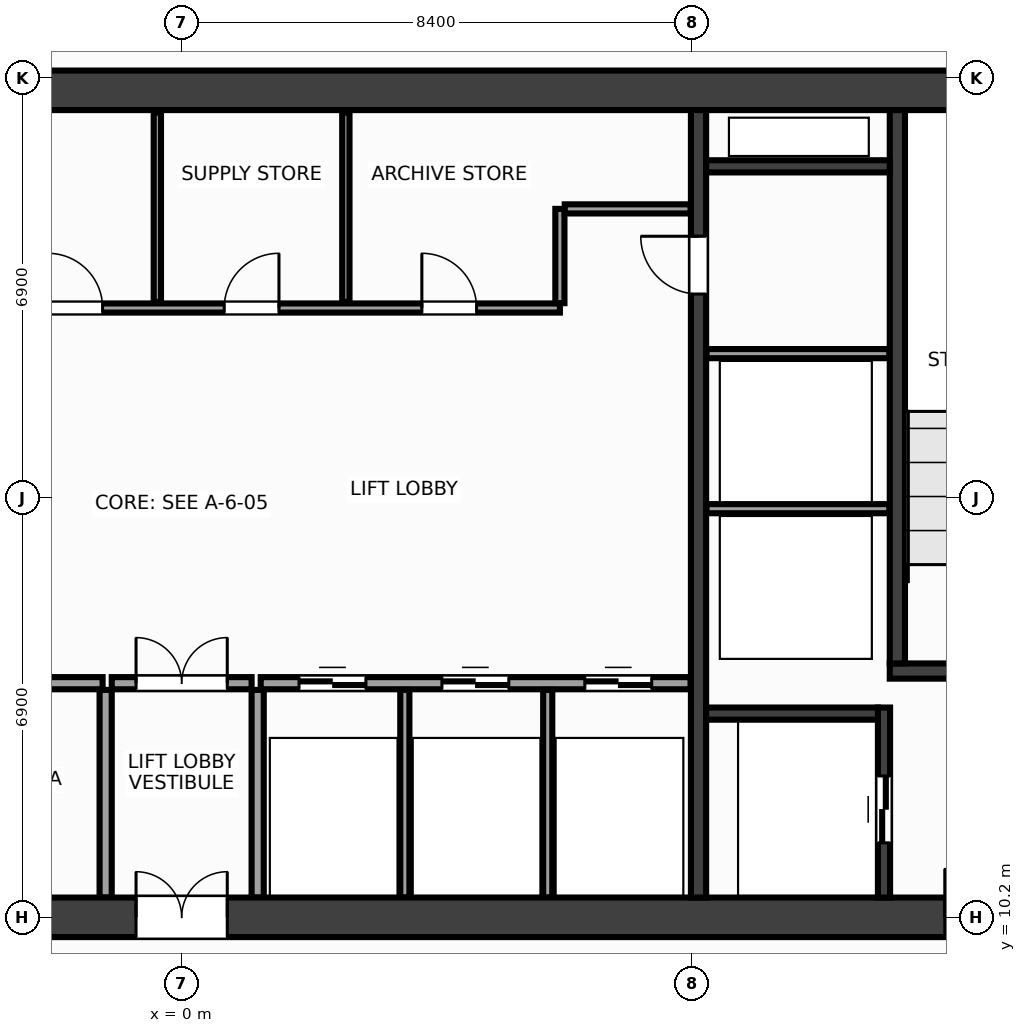
"""IFC4 building model, lengths in metres.
Left out: names, types, materials, properties, quantities, classifications, styles, units other than length and angle.
Written with IfcOpenShell. Run it as: python <this file> out.ifc"""

import sys

from ifc_helpers import new_model, si_unit, direction, frame, frame_2d, origin, place, context, subcontext, project, spatial, rectangle, extrude, source, transform, mapped, element, fill, save


model = new_model("IFC4")
c1 = context("Model", 3, precision=1e-05, world=origin(), true_north=direction((0.0, 1.0)))
c2 = subcontext(c1, "Body", "Model", "MODEL_VIEW")
j1 = project(units=[si_unit("LENGTHUNIT", "METRE"), si_unit("PLANEANGLEUNIT", "RADIAN")], contexts=[c1])
p1 = place(None, origin())
s1 = spatial("IfcSite", under=j1, at=p1, CompositionType="ELEMENT")
p2 = place(p1, origin())
s2 = spatial("IfcBuilding", under=s1, at=p2, CompositionType="ELEMENT")
p3 = place(p2, frame((0.0, 0.0, 138.8)))
s3 = spatial("IfcBuildingStorey", under=s2, at=p3, CompositionType="ELEMENT", Elevation=138.8)
m1 = source(origin(), c2, "Body", "SweptSolid", [
    extrude(rectangle(XDim=31.85, YDim=0.65, at=frame_2d((15.925, 0.0))), origin(), (0.0, 0.0, 1.0), 3.6),
])
p4 = place(p3, frame((-15.925, 23.8, 0.0), z_axis=(0.0, 0.0, 1.0), x_axis=(1.0, 0.0, 0.0)))
e1 = element("IfcWall", 1, at=p4, inside=s3, PredefinedType="SHEAR", context=c2, shape_type="MappedRepresentation", body=[
    mapped(m1, transform((0.0, 0.0, 0.0), x_axis=(1.0, 0.0, 0.0), y_axis=(0.0, 1.0, 0.0), z_axis=(0.0, 0.0, 1.0), scale=1.0)),
])
p5 = place(p3, frame((-15.925, 10.2, 0.0), z_axis=(0.0, 0.0, 1.0), x_axis=(1.0, 0.0, 0.0)))
e2 = element("IfcWall", 2, at=p5, inside=s3, PredefinedType="SHEAR", context=c2, shape_type="MappedRepresentation", body=[
    mapped(m1, transform((0.0, 0.0, 0.0), x_axis=(1.0, 0.0, 0.0), y_axis=(0.0, 1.0, 0.0), z_axis=(0.0, 0.0, 1.0), scale=1.0)),
])
p6 = place(p5, frame((1.775, 0.0, 0.0)))
e3 = element("IfcOpeningElement", 3, at=p6, cuts=e2, PredefinedType="OPENING", context=c2, shape_type="SweptSolid", body=[
    extrude(rectangle(XDim=1.6, YDim=2.15, at=frame_2d((0.8, 1.075))), frame((0.0, 0.337, 0.0), z_axis=(0.0, -1.0, 0.0), x_axis=(1.0, 0.0, 0.0)), (0.0, 0.0, 1.0), 0.674),
])
p7 = place(p5, frame((28.475, 0.0, 0.0)))
e4 = element("IfcOpeningElement", 4, at=p7, cuts=e2, PredefinedType="OPENING", context=c2, shape_type="SweptSolid", body=[
    extrude(rectangle(XDim=1.6, YDim=2.15, at=frame_2d((0.8, 1.075))), frame((0.0, 0.337, 0.0), z_axis=(0.0, -1.0, 0.0), x_axis=(1.0, 0.0, 0.0)), (0.0, 0.0, 1.0), 0.674),
])
p8 = place(p5, frame((15.175, 0.0, 0.0)))
e5 = element("IfcOpeningElement", 5, at=p8, cuts=e2, PredefinedType="OPENING", context=c2, shape_type="SweptSolid", body=[
    extrude(rectangle(XDim=1.5, YDim=2.2, at=frame_2d((0.75, 1.1))), frame((0.0, 0.337, 0.0), z_axis=(0.0, -1.0, 0.0), x_axis=(1.0, 0.0, 0.0)), (0.0, 0.0, 1.0), 0.674),
])
m2 = source(origin(), c2, "Body", "SweptSolid", [
    extrude(rectangle(XDim=12.95, YDim=0.25, at=frame_2d((6.475, 0.0))), origin(), (0.0, 0.0, 1.0), 3.6),
])
p9 = place(p3, frame((8.5, 10.525, 0.0), z_axis=(0.0, 0.0, 1.0), x_axis=(0.0, 1.0, 0.0)))
e6 = element("IfcWall", 6, at=p9, inside=s3, PredefinedType="SHEAR", context=c2, shape_type="MappedRepresentation", body=[
    mapped(m2, transform((0.0, 0.0, 0.0), x_axis=(1.0, 0.0, 0.0), y_axis=(0.0, 1.0, 0.0), z_axis=(0.0, 0.0, 1.0), scale=1.0)),
])
p10 = place(p9, frame((9.925, 0.0, 0.0)))
e7 = element("IfcOpeningElement", 7, at=p10, cuts=e6, PredefinedType="OPENING", context=c2, shape_type="SweptSolid", body=[
    extrude(rectangle(XDim=0.95, YDim=2.15, at=frame_2d((0.475, 1.075))), frame((0.0, 0.137, 0.0), z_axis=(0.0, -1.0, 0.0), x_axis=(1.0, 0.0, 0.0)), (0.0, 0.0, 1.0), 0.274),
])
m3 = source(origin(), c2, "Body", "SweptSolid", [
    extrude(rectangle(XDim=3.63, YDim=0.25, at=frame_2d((1.815, 0.0))), origin(), (0.0, 0.0, 1.0), 3.6),
])
p11 = place(p3, frame((11.645, 14.25, 0.0), z_axis=(0.0, 0.0, 1.0), x_axis=(1.0, 0.0, 0.0)))
e8 = element("IfcWall", 8, at=p11, inside=s3, PredefinedType="SHEAR", context=c2, shape_type="MappedRepresentation", body=[
    mapped(m3, transform((0.0, 0.0, 0.0), x_axis=(1.0, 0.0, 0.0), y_axis=(0.0, 1.0, 0.0), z_axis=(0.0, 0.0, 1.0), scale=1.0)),
])
p12 = place(p11, frame((0.95, 0.0, 0.0)))
e9 = element("IfcOpeningElement", 9, at=p12, cuts=e8, PredefinedType="OPENING", context=c2, shape_type="SweptSolid", body=[
    extrude(rectangle(XDim=1.6, YDim=2.15, at=frame_2d((0.8, 1.075))), frame((0.0, 0.137, 0.0), z_axis=(0.0, -1.0, 0.0), x_axis=(1.0, 0.0, 0.0)), (0.0, 0.0, 1.0), 0.274),
])
m4 = source(origin(), c2, "Body", "SweptSolid", [
    extrude(rectangle(XDim=9.1, YDim=0.25, at=frame_2d((4.55, 0.0))), origin(), (0.0, 0.0, 1.0), 3.6),
])
p13 = place(p3, frame((11.77, 14.375, 0.0), z_axis=(0.0, 0.0, 1.0), x_axis=(0.0, 1.0, 0.0)))
e10 = element("IfcWall", 10, at=p13, inside=s3, PredefinedType="SHEAR", context=c2, shape_type="MappedRepresentation", body=[
    mapped(m4, transform((0.0, 0.0, 0.0), x_axis=(1.0, 0.0, 0.0), y_axis=(0.0, 1.0, 0.0), z_axis=(0.0, 0.0, 1.0), scale=1.0)),
])
m5 = source(origin(), c2, "Body", "SweptSolid", [
    extrude(rectangle(XDim=3.125, YDim=0.2, at=frame_2d((1.562, 0.0))), origin(), (0.0, 0.0, 1.0), 3.6),
])
p14 = place(p3, frame((11.55, 10.525, 0.0), z_axis=(0.0, 0.0, 1.0), x_axis=(0.0, 1.0, 0.0)))
e11 = element("IfcWall", 11, at=p14, inside=s3, PredefinedType="SHEAR", context=c2, shape_type="MappedRepresentation", body=[
    mapped(m5, transform((0.0, 0.0, 0.0), x_axis=(1.0, 0.0, 0.0), y_axis=(0.0, 1.0, 0.0), z_axis=(0.0, 0.0, 1.0), scale=1.0)),
])
p15 = place(p14, frame((0.9, 0.0, 0.0)))
e12 = element("IfcOpeningElement", 12, at=p15, cuts=e11, PredefinedType="OPENING", context=c2, shape_type="SweptSolid", body=[
    extrude(rectangle(XDim=1.1, YDim=2.15, at=frame_2d((0.55, 1.075))), frame((0.0, 0.112, 0.0), z_axis=(0.0, -1.0, 0.0), x_axis=(1.0, 0.0, 0.0)), (0.0, 0.0, 1.0), 0.224),
])
m6 = source(origin(), c2, "Body", "SweptSolid", [
    extrude(rectangle(XDim=2.825, YDim=0.2, at=frame_2d((1.413, 0.0))), origin(), (0.0, 0.0, 1.0), 3.6),
])
p16 = place(p3, frame((8.625, 13.55, 0.0), z_axis=(0.0, 0.0, 1.0), x_axis=(1.0, 0.0, 0.0)))
e13 = element("IfcWall", 13, at=p16, inside=s3, PredefinedType="SHEAR", context=c2, shape_type="MappedRepresentation", body=[
    mapped(m6, transform((0.0, 0.0, 0.0), x_axis=(1.0, 0.0, 0.0), y_axis=(0.0, 1.0, 0.0), z_axis=(0.0, 0.0, 1.0), scale=1.0)),
])
m7 = source(origin(), c2, "Body", "SweptSolid", [
    extrude(rectangle(XDim=3.02, YDim=0.2, at=frame_2d((1.51, 0.0))), origin(), (0.0, 0.0, 1.0), 3.6),
])
p17 = place(p3, frame((8.625, 22.55, 0.0), z_axis=(0.0, 0.0, 1.0), x_axis=(1.0, 0.0, 0.0)))
e14 = element("IfcWall", 14, at=p17, inside=s3, PredefinedType="SHEAR", context=c2, shape_type="MappedRepresentation", body=[
    mapped(m7, transform((0.0, 0.0, 0.0), x_axis=(1.0, 0.0, 0.0), y_axis=(0.0, 1.0, 0.0), z_axis=(0.0, 0.0, 1.0), scale=1.0)),
])
m8 = source(origin(), c2, "Body", "SweptSolid", [
    extrude(rectangle(XDim=3.01, YDim=0.15, at=frame_2d((1.505, 0.0))), origin(), (0.0, 0.0, 1.0), 3.38),
])
for number, where, z_axis, x_axis in (
    (15, (8.63, 16.92, 0.0), (0.0, 0.0, 1.0), (1.0, 0.0, 0.0)),
    (16, (8.63, 19.47, 0.0), (0.0, 0.0, 1.0), (1.0, 0.0, 0.0)),
):
    element("IfcWall", number, at=place(p3, frame(where, z_axis=z_axis, x_axis=x_axis)), inside=s3, PredefinedType="PARTITIONING", context=c2, shape_type="MappedRepresentation", body=[
        mapped(m8, transform((0.0, 0.0, 0.0), x_axis=(1.0, 0.0, 0.0), y_axis=(0.0, 1.0, 0.0), z_axis=(0.0, 0.0, 1.0), scale=1.0)),
    ])
m9 = source(origin(), c2, "Body", "SweptSolid", [
    extrude(rectangle(XDim=7.07, YDim=0.2, at=frame_2d((3.535, 0.0))), origin(), (0.0, 0.0, 1.0), 3.38),
])
p18 = place(p3, frame((-8.37, 14.05, 0.0), z_axis=(0.0, 0.0, 1.0), x_axis=(1.0, 0.0, 0.0)))
e17 = element("IfcWall", 17, at=p18, inside=s3, PredefinedType="PARTITIONING", context=c2, shape_type="MappedRepresentation", body=[
    mapped(m9, transform((0.0, 0.0, 0.0), x_axis=(1.0, 0.0, 0.0), y_axis=(0.0, 1.0, 0.0), z_axis=(0.0, 0.0, 1.0), scale=1.0)),
])
p19 = place(p18, frame((1.06, 0.0, 0.0)))
e18 = element("IfcOpeningElement", 18, at=p19, cuts=e17, PredefinedType="OPENING", context=c2, shape_type="SweptSolid", body=[
    extrude(rectangle(XDim=0.9, YDim=2.15, at=frame_2d((0.45, 1.075))), frame((0.0, 0.112, 0.0), z_axis=(0.0, -1.0, 0.0), x_axis=(1.0, 0.0, 0.0)), (0.0, 0.0, 1.0), 0.224),
])
p20 = place(p18, frame((4.51, 0.0, 0.0)))
e19 = element("IfcOpeningElement", 19, at=p20, cuts=e17, PredefinedType="OPENING", context=c2, shape_type="SweptSolid", body=[
    extrude(rectangle(XDim=0.9, YDim=2.15, at=frame_2d((0.45, 1.075))), frame((0.0, 0.112, 0.0), z_axis=(0.0, -1.0, 0.0), x_axis=(1.0, 0.0, 0.0)), (0.0, 0.0, 1.0), 0.224),
])
p21 = place(p3, frame((1.3, 14.05, 0.0), z_axis=(0.0, 0.0, 1.0), x_axis=(1.0, 0.0, 0.0)))
e20 = element("IfcWall", 20, at=p21, inside=s3, PredefinedType="PARTITIONING", context=c2, shape_type="MappedRepresentation", body=[
    mapped(m9, transform((0.0, 0.0, 0.0), x_axis=(1.0, 0.0, 0.0), y_axis=(0.0, 1.0, 0.0), z_axis=(0.0, 0.0, 1.0), scale=1.0)),
])
p22 = place(p21, frame((0.63, 0.0, 0.0)))
e21 = element("IfcOpeningElement", 21, at=p22, cuts=e20, PredefinedType="OPENING", context=c2, shape_type="SweptSolid", body=[
    extrude(rectangle(XDim=1.1, YDim=2.15, at=frame_2d((0.55, 1.075))), frame((0.0, 0.112, 0.0), z_axis=(0.0, -1.0, 0.0), x_axis=(1.0, 0.0, 0.0)), (0.0, 0.0, 1.0), 0.224),
])
p23 = place(p21, frame((2.98, 0.0, 0.0)))
e22 = element("IfcOpeningElement", 22, at=p23, cuts=e20, PredefinedType="OPENING", context=c2, shape_type="SweptSolid", body=[
    extrude(rectangle(XDim=1.1, YDim=2.15, at=frame_2d((0.55, 1.075))), frame((0.0, 0.112, 0.0), z_axis=(0.0, -1.0, 0.0), x_axis=(1.0, 0.0, 0.0)), (0.0, 0.0, 1.0), 0.224),
])
p24 = place(p21, frame((5.33, 0.0, 0.0)))
e23 = element("IfcOpeningElement", 23, at=p24, cuts=e20, PredefinedType="OPENING", context=c2, shape_type="SweptSolid", body=[
    extrude(rectangle(XDim=1.1, YDim=2.15, at=frame_2d((0.55, 1.075))), frame((0.0, 0.112, 0.0), z_axis=(0.0, -1.0, 0.0), x_axis=(1.0, 0.0, 0.0)), (0.0, 0.0, 1.0), 0.224),
])
m10 = source(origin(), c2, "Body", "SweptSolid", [
    extrude(rectangle(XDim=3.415, YDim=0.2, at=frame_2d((1.708, 0.0))), origin(), (0.0, 0.0, 1.0), 3.38),
])
for number, where, z_axis, x_axis in (
    (24, (-1.25, 10.525, 0.0), (0.0, 0.0, 1.0), (0.0, 1.0, 0.0)),
    (25, (1.25, 10.525, 0.0), (0.0, 0.0, 1.0), (0.0, 1.0, 0.0)),
):
    element("IfcWall", number, at=place(p3, frame(where, z_axis=z_axis, x_axis=x_axis)), inside=s3, PredefinedType="PARTITIONING", context=c2, shape_type="MappedRepresentation", body=[
        mapped(m10, transform((0.0, 0.0, 0.0), x_axis=(1.0, 0.0, 0.0), y_axis=(0.0, 1.0, 0.0), z_axis=(0.0, 0.0, 1.0), scale=1.0)),
    ])
m11 = source(origin(), c2, "Body", "SweptSolid", [
    extrude(rectangle(XDim=2.3, YDim=0.2, at=frame_2d((1.15, 0.0))), origin(), (0.0, 0.0, 1.0), 3.38),
])
p25 = place(p3, frame((-1.15, 14.05, 0.0), z_axis=(0.0, 0.0, 1.0), x_axis=(1.0, 0.0, 0.0)))
e26 = element("IfcWall", 26, at=p25, inside=s3, PredefinedType="PARTITIONING", context=c2, shape_type="MappedRepresentation", body=[
    mapped(m11, transform((0.0, 0.0, 0.0), x_axis=(1.0, 0.0, 0.0), y_axis=(0.0, 1.0, 0.0), z_axis=(0.0, 0.0, 1.0), scale=1.0)),
])
p26 = place(p25, frame((0.4, 0.0, 0.0)))
e27 = element("IfcOpeningElement", 27, at=p26, cuts=e26, PredefinedType="OPENING", context=c2, shape_type="SweptSolid", body=[
    extrude(rectangle(XDim=1.5, YDim=2.2, at=frame_2d((0.75, 1.1))), frame((0.0, 0.112, 0.0), z_axis=(0.0, -1.0, 0.0), x_axis=(1.0, 0.0, 0.0)), (0.0, 0.0, 1.0), 0.224),
])
m12 = source(origin(), c2, "Body", "SweptSolid", [
    extrude(rectangle(XDim=14.59, YDim=0.15, at=frame_2d((7.295, 0.0))), origin(), (0.0, 0.0, 1.0), 3.38),
])
p27 = place(p3, frame((-8.37, 20.22, 0.0), z_axis=(0.0, 0.0, 1.0), x_axis=(1.0, 0.0, 0.0)))
e28 = element("IfcWall", 28, at=p27, inside=s3, PredefinedType="PARTITIONING", context=c2, shape_type="MappedRepresentation", body=[
    mapped(m12, transform((0.0, 0.0, 0.0), x_axis=(1.0, 0.0, 0.0), y_axis=(0.0, 1.0, 0.0), z_axis=(0.0, 0.0, 1.0), scale=1.0)),
])
p28 = place(p27, frame((0.86, 0.0, 0.0)))
e29 = element("IfcOpeningElement", 29, at=p28, cuts=e28, PredefinedType="OPENING", context=c2, shape_type="SweptSolid", body=[
    extrude(rectangle(XDim=0.9, YDim=2.15, at=frame_2d((0.45, 1.075))), frame((0.0, 0.087, 0.0), z_axis=(0.0, -1.0, 0.0), x_axis=(1.0, 0.0, 0.0)), (0.0, 0.0, 1.0), 0.174),
])
p29 = place(p27, frame((3.47, 0.0, 0.0)))
e30 = element("IfcOpeningElement", 30, at=p29, cuts=e28, PredefinedType="OPENING", context=c2, shape_type="SweptSolid", body=[
    extrude(rectangle(XDim=0.9, YDim=2.15, at=frame_2d((0.45, 1.075))), frame((0.0, 0.087, 0.0), z_axis=(0.0, -1.0, 0.0), x_axis=(1.0, 0.0, 0.0)), (0.0, 0.0, 1.0), 0.174),
])
p30 = place(p27, frame((6.17, 0.0, 0.0)))
e31 = element("IfcOpeningElement", 31, at=p30, cuts=e28, PredefinedType="OPENING", context=c2, shape_type="SweptSolid", body=[
    extrude(rectangle(XDim=0.9, YDim=2.15, at=frame_2d((0.45, 1.075))), frame((0.0, 0.087, 0.0), z_axis=(0.0, -1.0, 0.0), x_axis=(1.0, 0.0, 0.0)), (0.0, 0.0, 1.0), 0.174),
])
p31 = place(p27, frame((9.07, 0.0, 0.0)))
e32 = element("IfcOpeningElement", 32, at=p31, cuts=e28, PredefinedType="OPENING", context=c2, shape_type="SweptSolid", body=[
    extrude(rectangle(XDim=0.9, YDim=2.15, at=frame_2d((0.45, 1.075))), frame((0.0, 0.087, 0.0), z_axis=(0.0, -1.0, 0.0), x_axis=(1.0, 0.0, 0.0)), (0.0, 0.0, 1.0), 0.174),
])
p32 = place(p27, frame((12.32, 0.0, 0.0)))
e33 = element("IfcOpeningElement", 33, at=p32, cuts=e28, PredefinedType="OPENING", context=c2, shape_type="SweptSolid", body=[
    extrude(rectangle(XDim=0.9, YDim=2.15, at=frame_2d((0.45, 1.075))), frame((0.0, 0.087, 0.0), z_axis=(0.0, -1.0, 0.0), x_axis=(1.0, 0.0, 0.0)), (0.0, 0.0, 1.0), 0.174),
])
m13 = source(origin(), c2, "Body", "SweptSolid", [
    extrude(rectangle(XDim=1.55, YDim=0.15, at=frame_2d((0.775, 0.0))), origin(), (0.0, 0.0, 1.0), 3.38),
])
p33 = place(p3, frame((6.22, 20.3, 0.0), z_axis=(0.0, 0.0, 1.0), x_axis=(0.0, 1.0, 0.0)))
e34 = element("IfcWall", 34, at=p33, inside=s3, PredefinedType="PARTITIONING", context=c2, shape_type="MappedRepresentation", body=[
    mapped(m13, transform((0.0, 0.0, 0.0), x_axis=(1.0, 0.0, 0.0), y_axis=(0.0, 1.0, 0.0), z_axis=(0.0, 0.0, 1.0), scale=1.0)),
])
m14 = source(origin(), c2, "Body", "SweptSolid", [
    extrude(rectangle(XDim=2.07, YDim=0.15, at=frame_2d((1.035, 0.0))), origin(), (0.0, 0.0, 1.0), 3.38),
])
p34 = place(p3, frame((6.3, 21.85, 0.0), z_axis=(0.0, 0.0, 1.0), x_axis=(1.0, 0.0, 0.0)))
e35 = element("IfcWall", 35, at=p34, inside=s3, PredefinedType="PARTITIONING", context=c2, shape_type="MappedRepresentation", body=[
    mapped(m14, transform((0.0, 0.0, 0.0), x_axis=(1.0, 0.0, 0.0), y_axis=(0.0, 1.0, 0.0), z_axis=(0.0, 0.0, 1.0), scale=1.0)),
])
m15 = source(origin(), c2, "Body", "SweptSolid", [
    extrude(rectangle(XDim=3.415, YDim=0.15, at=frame_2d((1.708, 0.0))), origin(), (0.0, 0.0, 1.0), 3.38),
])
for number, where, z_axis, x_axis in (
    (36, (3.67, 10.525, 0.0), (0.0, 0.0, 1.0), (0.0, 1.0, 0.0)),
    (37, (6.02, 10.525, 0.0), (0.0, 0.0, 1.0), (0.0, 1.0, 0.0)),
):
    element("IfcWall", number, at=place(p3, frame(where, z_axis=z_axis, x_axis=x_axis)), inside=s3, PredefinedType="PARTITIONING", context=c2, shape_type="MappedRepresentation", body=[
        mapped(m15, transform((0.0, 0.0, 0.0), x_axis=(1.0, 0.0, 0.0), y_axis=(0.0, 1.0, 0.0), z_axis=(0.0, 0.0, 1.0), scale=1.0)),
    ])
m16 = source(origin(), c2, "Body", "SweptSolid", [
    extrude(rectangle(XDim=3.115, YDim=0.12, at=frame_2d((1.558, 0.0))), origin(), (0.0, 0.0, 1.0), 3.38),
])
for number, where, z_axis, x_axis in (
    (38, (-0.4, 20.32, 0.0), (0.0, 0.0, 1.0), (0.0, 1.0, 0.0)),
    (39, (2.7, 20.32, 0.0), (0.0, 0.0, 1.0), (0.0, 1.0, 0.0)),
):
    element("IfcWall", number, at=place(p3, frame(where, z_axis=z_axis, x_axis=x_axis)), inside=s3, PredefinedType="PARTITIONING", context=c2, shape_type="MappedRepresentation", body=[
        mapped(m16, transform((0.0, 0.0, 0.0), x_axis=(1.0, 0.0, 0.0), y_axis=(0.0, 1.0, 0.0), z_axis=(0.0, 0.0, 1.0), scale=1.0)),
    ])
m17 = source(origin(), c2, "Body", "SweptSolid", [
    extrude(rectangle(XDim=1.6, YDim=2.15, at=frame_2d((0.8, 1.075))), frame((0.0, 0.025, 0.0), z_axis=(0.0, -1.0, 0.0), x_axis=(1.0, 0.0, 0.0)), (0.0, 0.0, 1.0), 0.05),
])
p35 = place(p7, origin())
e40 = element("IfcDoor", 40, at=p35, inside=s3, OperationType="DOUBLE_DOOR_SINGLE_SWING", PredefinedType="DOOR", context=c2, shape_type="MappedRepresentation", body=[
    mapped(m17, transform((0.0, 0.0, 0.0), x_axis=(1.0, 0.0, 0.0), y_axis=(0.0, 1.0, 0.0), z_axis=(0.0, 0.0, 1.0), scale=1.0)),
])
fill(e4, e40)
m18 = source(origin(), c2, "Body", "SweptSolid", [
    extrude(rectangle(XDim=1.1, YDim=2.15, at=frame_2d((0.55, 1.075))), frame((0.0, 0.025, 0.0), z_axis=(0.0, -1.0, 0.0), x_axis=(1.0, 0.0, 0.0)), (0.0, 0.0, 1.0), 0.05),
])
p36 = place(p15, origin())
e41 = element("IfcDoor", 41, at=p36, inside=s3, OperationType="DOUBLE_DOOR_SLIDING", PredefinedType="DOOR", context=c2, shape_type="MappedRepresentation", body=[
    mapped(m18, transform((0.0, 0.0, 0.0), x_axis=(1.0, 0.0, 0.0), y_axis=(0.0, 1.0, 0.0), z_axis=(0.0, 0.0, 1.0), scale=1.0)),
])
fill(e12, e41)
m19 = source(origin(), c2, "Body", "SweptSolid", [
    extrude(rectangle(XDim=0.95, YDim=2.15, at=frame_2d((0.475, 1.075))), frame((0.0, 0.025, 0.0), z_axis=(0.0, -1.0, 0.0), x_axis=(1.0, 0.0, 0.0)), (0.0, 0.0, 1.0), 0.05),
])
p37 = place(p10, origin())
e42 = element("IfcDoor", 42, at=p37, inside=s3, OperationType="SINGLE_SWING_RIGHT", PredefinedType="DOOR", context=c2, shape_type="MappedRepresentation", body=[
    mapped(m19, transform((0.0, 0.0, 0.0), x_axis=(1.0, 0.0, 0.0), y_axis=(0.0, 1.0, 0.0), z_axis=(0.0, 0.0, 1.0), scale=1.0)),
])
fill(e7, e42)
p38 = place(p22, origin())
e43 = element("IfcDoor", 43, at=p38, inside=s3, OperationType="DOUBLE_DOOR_SLIDING", PredefinedType="DOOR", context=c2, shape_type="MappedRepresentation", body=[
    mapped(m18, transform((0.0, 0.0, 0.0), x_axis=(1.0, 0.0, 0.0), y_axis=(0.0, 1.0, 0.0), z_axis=(0.0, 0.0, 1.0), scale=1.0)),
])
fill(e21, e43)
p39 = place(p23, origin())
e44 = element("IfcDoor", 44, at=p39, inside=s3, OperationType="DOUBLE_DOOR_SLIDING", PredefinedType="DOOR", context=c2, shape_type="MappedRepresentation", body=[
    mapped(m18, transform((0.0, 0.0, 0.0), x_axis=(1.0, 0.0, 0.0), y_axis=(0.0, 1.0, 0.0), z_axis=(0.0, 0.0, 1.0), scale=1.0)),
])
fill(e22, e44)
p40 = place(p24, origin())
e45 = element("IfcDoor", 45, at=p40, inside=s3, OperationType="DOUBLE_DOOR_SLIDING", PredefinedType="DOOR", context=c2, shape_type="MappedRepresentation", body=[
    mapped(m18, transform((0.0, 0.0, 0.0), x_axis=(1.0, 0.0, 0.0), y_axis=(0.0, 1.0, 0.0), z_axis=(0.0, 0.0, 1.0), scale=1.0)),
])
fill(e23, e45)
m20 = source(origin(), c2, "Body", "SweptSolid", [
    extrude(rectangle(XDim=1.5, YDim=2.2, at=frame_2d((0.75, 1.1))), frame((0.0, 0.025, 0.0), z_axis=(0.0, -1.0, 0.0), x_axis=(1.0, 0.0, 0.0)), (0.0, 0.0, 1.0), 0.05),
])
p41 = place(p26, origin())
e46 = element("IfcDoor", 46, at=p41, inside=s3, OperationType="DOUBLE_DOOR_SINGLE_SWING", PredefinedType="DOOR", context=c2, shape_type="MappedRepresentation", body=[
    mapped(m20, transform((0.0, 0.0, 0.0), x_axis=(1.0, 0.0, 0.0), y_axis=(0.0, 1.0, 0.0), z_axis=(0.0, 0.0, 1.0), scale=1.0)),
])
fill(e27, e46)
p42 = place(p8, origin())
e47 = element("IfcDoor", 47, at=p42, inside=s3, OperationType="DOUBLE_DOOR_SINGLE_SWING", PredefinedType="DOOR", context=c2, shape_type="MappedRepresentation", body=[
    mapped(m20, transform((0.0, 0.0, 0.0), x_axis=(1.0, 0.0, 0.0), y_axis=(0.0, 1.0, 0.0), z_axis=(0.0, 0.0, 1.0), scale=1.0)),
])
fill(e5, e47)
m21 = source(origin(), c2, "Body", "SweptSolid", [
    extrude(rectangle(XDim=0.9, YDim=2.15, at=frame_2d((0.45, 1.075))), frame((0.0, 0.025, 0.0), z_axis=(0.0, -1.0, 0.0), x_axis=(1.0, 0.0, 0.0)), (0.0, 0.0, 1.0), 0.05),
])
p43 = place(p30, origin())
e48 = element("IfcDoor", 48, at=p43, inside=s3, OperationType="SINGLE_SWING_LEFT", PredefinedType="DOOR", context=c2, shape_type="MappedRepresentation", body=[
    mapped(m21, transform((0.0, 0.0, 0.0), x_axis=(1.0, 0.0, 0.0), y_axis=(0.0, 1.0, 0.0), z_axis=(0.0, 0.0, 1.0), scale=1.0)),
])
fill(e31, e48)
p44 = place(p31, origin())
e49 = element("IfcDoor", 49, at=p44, inside=s3, OperationType="SINGLE_SWING_RIGHT", PredefinedType="DOOR", context=c2, shape_type="MappedRepresentation", body=[
    mapped(m21, transform((0.0, 0.0, 0.0), x_axis=(1.0, 0.0, 0.0), y_axis=(0.0, 1.0, 0.0), z_axis=(0.0, 0.0, 1.0), scale=1.0)),
])
fill(e32, e49)
p45 = place(p32, origin())
e50 = element("IfcDoor", 50, at=p45, inside=s3, OperationType="SINGLE_SWING_LEFT", PredefinedType="DOOR", context=c2, shape_type="MappedRepresentation", body=[
    mapped(m21, transform((0.0, 0.0, 0.0), x_axis=(1.0, 0.0, 0.0), y_axis=(0.0, 1.0, 0.0), z_axis=(0.0, 0.0, 1.0), scale=1.0)),
])
fill(e33, e50)
save(model, sys.argv[1])
